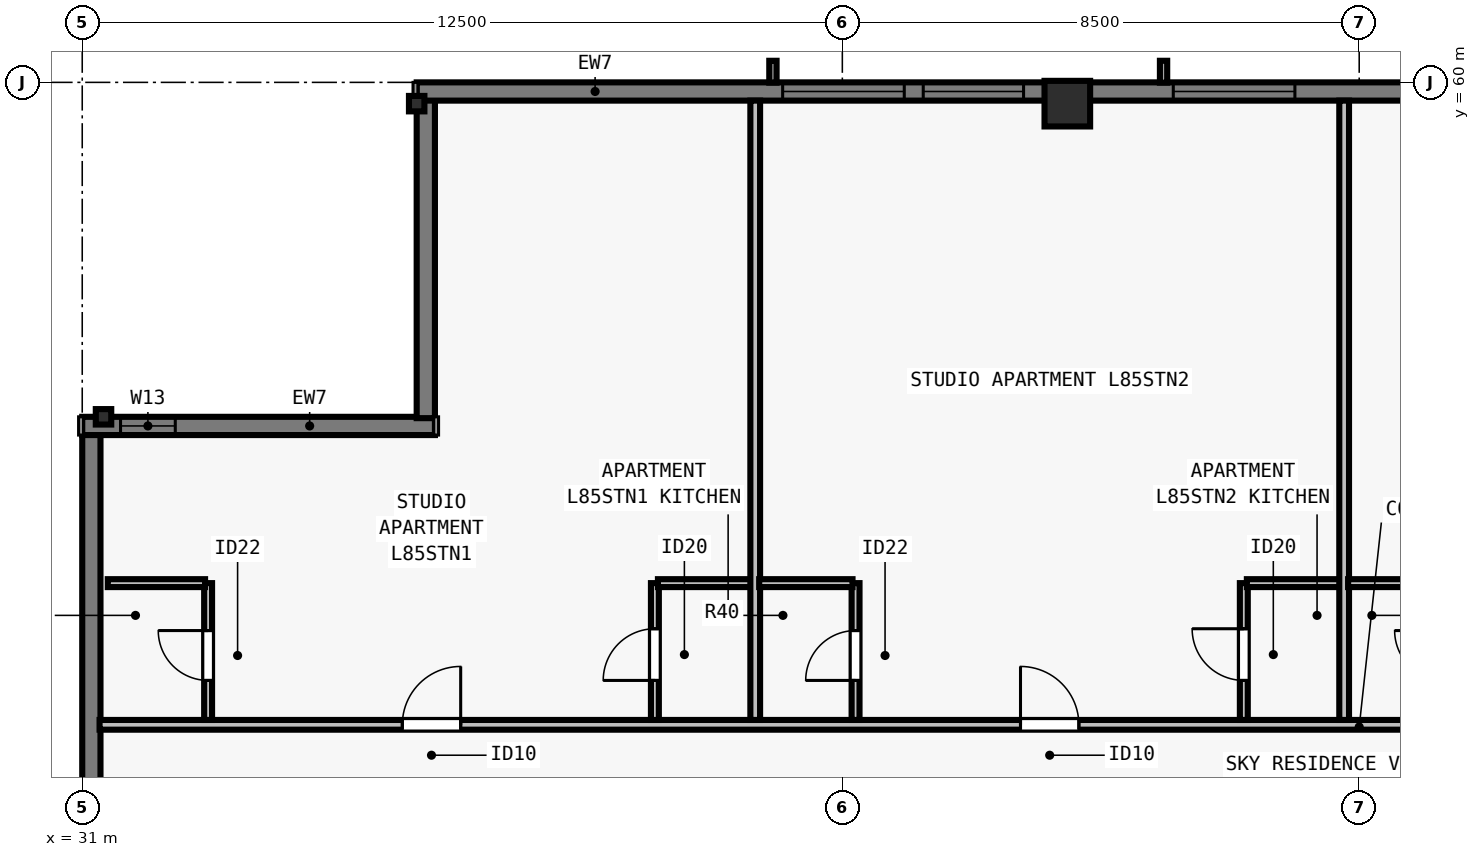
"""IFC4 building model, lengths in metres.
Left out: names, types, materials, properties, quantities, classifications, styles, units other than length and angle.
Written with IfcOpenShell. Run it as: python <this file> out.ifc"""

import sys

from ifc_helpers import new_model, si_unit, direction, frame, frame_2d, origin, origin_2d, place, context, subcontext, project, spatial, rectangle, i_section, extrude, element, fill, save


model = new_model("IFC4")
c1 = context("Model", 3, precision=1e-05, world=origin(), true_north=direction((0.0, 1.0)))
c2 = subcontext(c1, "Body", "Model", "MODEL_VIEW")
j1 = project(units=[si_unit("LENGTHUNIT", "METRE"), si_unit("PLANEANGLEUNIT", "RADIAN")], contexts=[c1])
p1 = place(None, origin())
s1 = spatial("IfcSite", under=j1, at=p1, CompositionType="ELEMENT")
p2 = place(p1, origin())
s2 = spatial("IfcBuilding", under=s1, at=p2, CompositionType="ELEMENT")
p3 = place(p2, frame((0.0, 0.0, 308.5)))
s3 = spatial("IfcBuildingStorey", under=s2, at=p3, CompositionType="ELEMENT", Elevation=308.5)
p4 = place(p3, frame((47.2, 59.65, 0.0), z_axis=(0.0, 0.0, 1.0), x_axis=(1.0, 0.0, 0.0)))
e1 = element("IfcColumn", 1, at=p4, inside=s3, PredefinedType="COLUMN", context=c2, shape_type="SweptSolid", body=[
    extrude(rectangle(XDim=0.75, YDim=0.75, at=origin_2d()), origin(), (0.0, 0.0, 1.0), 3.5),
])
for number, where, z_axis, x_axis in (
    (2, (36.5, 59.65, 0.0), (0.0, 0.0, 1.0), (1.0, 0.0, 0.0)),
    (3, (31.35, 54.5, 0.0), (0.0, 0.0, 1.0), (0.0, 1.0, 0.0)),
):
    element("IfcColumn", number, at=place(p3, frame(where, z_axis=z_axis, x_axis=x_axis)), inside=s3, PredefinedType="COLUMN", context=c2, shape_type="SweptSolid", body=[
        extrude(i_section(OverallWidth=0.254, OverallDepth=0.254, WebThickness=0.009, FlangeThickness=0.014, FilletRadius=0.013, at=origin_2d()), origin(), (0.0, 0.0, 1.0), 3.5),
    ])
p5 = place(p3, frame((31.15, 23.5, 0.0), z_axis=(0.0, 0.0, 1.0), x_axis=(0.0, 1.0, 0.0)))
e4 = element("IfcWall", 4, at=p5, inside=s3, PredefinedType="SOLIDWALL", context=c2, shape_type="SweptSolid", body=[
    extrude(rectangle(XDim=30.722, YDim=0.3, at=frame_2d((15.361, 0.0))), origin(), (0.0, 0.0, 1.0), 3.29),
])
p6 = place(p5, frame((8.331, 0.0, 0.8)))
e5 = element("IfcOpeningElement", 5, at=p6, cuts=e4, PredefinedType="OPENING", context=c2, shape_type="SweptSolid", body=[
    extrude(rectangle(XDim=1.65, YDim=1.758, at=frame_2d((0.825, 0.879))), frame((0.0, 0.16, 0.0), z_axis=(0.0, -1.0, 0.0), x_axis=(1.0, 0.0, 0.0)), (0.0, 0.0, 1.0), 0.32),
])
p7 = place(p5, frame((12.442, 0.0, 0.8)))
e6 = element("IfcOpeningElement", 6, at=p7, cuts=e4, PredefinedType="OPENING", context=c2, shape_type="SweptSolid", body=[
    extrude(rectangle(XDim=2.0, YDim=1.758, at=frame_2d((1.0, 0.879))), frame((0.0, 0.16, 0.0), z_axis=(0.0, -1.0, 0.0), x_axis=(1.0, 0.0, 0.0)), (0.0, 0.0, 1.0), 0.32),
])
p8 = place(p5, frame((16.455, 0.0, 0.8)))
e7 = element("IfcOpeningElement", 7, at=p8, cuts=e4, PredefinedType="OPENING", context=c2, shape_type="SweptSolid", body=[
    extrude(rectangle(XDim=1.65, YDim=1.758, at=frame_2d((0.825, 0.879))), frame((0.0, 0.16, 0.0), z_axis=(0.0, -1.0, 0.0), x_axis=(1.0, 0.0, 0.0)), (0.0, 0.0, 1.0), 0.32),
])
p9 = place(p5, frame((20.967, 0.0, 0.8)))
e8 = element("IfcOpeningElement", 8, at=p9, cuts=e4, PredefinedType="OPENING", context=c2, shape_type="SweptSolid", body=[
    extrude(rectangle(XDim=2.0, YDim=1.758, at=frame_2d((1.0, 0.879))), frame((0.0, 0.16, 0.0), z_axis=(0.0, -1.0, 0.0), x_axis=(1.0, 0.0, 0.0)), (0.0, 0.0, 1.0), 0.32),
])
p10 = place(p3, frame((31.0, 54.35, 0.0), z_axis=(0.0, 0.0, 1.0), x_axis=(1.0, 0.0, 0.0)))
e9 = element("IfcWall", 9, at=p10, inside=s3, PredefinedType="SOLIDWALL", context=c2, shape_type="SweptSolid", body=[
    extrude(rectangle(XDim=5.8, YDim=0.3, at=frame_2d((2.9, 0.0))), origin(), (0.0, 0.0, 1.0), 3.29),
])
p11 = place(p10, frame((0.63, 0.0, 0.8)))
e10 = element("IfcOpeningElement", 10, at=p11, cuts=e9, PredefinedType="OPENING", context=c2, shape_type="SweptSolid", body=[
    extrude(rectangle(XDim=0.9, YDim=1.75, at=frame_2d((0.45, 0.875))), frame((0.0, 0.16, 0.0), z_axis=(0.0, -1.0, 0.0), x_axis=(1.0, 0.0, 0.0)), (0.0, 0.0, 1.0), 0.32),
])
p12 = place(p3, frame((36.65, 54.478, 0.0), z_axis=(0.0, 0.0, 1.0), x_axis=(0.0, 1.0, 0.0)))
e11 = element("IfcWall", 11, at=p12, inside=s3, PredefinedType="SOLIDWALL", context=c2, shape_type="SweptSolid", body=[
    extrude(rectangle(XDim=5.244, YDim=0.3, at=frame_2d((2.622, 0.0))), origin(), (0.0, 0.0, 1.0), 3.29),
])
p13 = place(p3, frame((36.5, 59.85, 0.0), z_axis=(0.0, 0.0, 1.0), x_axis=(1.0, 0.0, 0.0)))
e12 = element("IfcWall", 12, at=p13, inside=s3, PredefinedType="SOLIDWALL", context=c2, shape_type="SweptSolid", body=[
    extrude(rectangle(XDim=30.722, YDim=0.3, at=frame_2d((15.361, 0.0))), origin(), (0.0, 0.0, 1.0), 3.29),
])
p14 = place(p13, frame((6.019, 0.0, 0.8)))
e13 = element("IfcOpeningElement", 13, at=p14, cuts=e12, PredefinedType="OPENING", context=c2, shape_type="SweptSolid", body=[
    extrude(rectangle(XDim=2.0, YDim=1.758, at=frame_2d((1.0, 0.879))), frame((0.0, 0.16, 0.0), z_axis=(0.0, -1.0, 0.0), x_axis=(1.0, 0.0, 0.0)), (0.0, 0.0, 1.0), 0.32),
])
p15 = place(p13, frame((8.331, 0.0, 0.8)))
e14 = element("IfcOpeningElement", 14, at=p15, cuts=e12, PredefinedType="OPENING", context=c2, shape_type="SweptSolid", body=[
    extrude(rectangle(XDim=1.65, YDim=1.758, at=frame_2d((0.825, 0.879))), frame((0.0, 0.16, 0.0), z_axis=(0.0, -1.0, 0.0), x_axis=(1.0, 0.0, 0.0)), (0.0, 0.0, 1.0), 0.32),
])
p16 = place(p13, frame((12.442, 0.0, 0.8)))
e15 = element("IfcOpeningElement", 15, at=p16, cuts=e12, PredefinedType="OPENING", context=c2, shape_type="SweptSolid", body=[
    extrude(rectangle(XDim=2.0, YDim=1.758, at=frame_2d((1.0, 0.879))), frame((0.0, 0.16, 0.0), z_axis=(0.0, -1.0, 0.0), x_axis=(1.0, 0.0, 0.0)), (0.0, 0.0, 1.0), 0.32),
])
p17 = place(p13, frame((16.455, 0.0, 0.8)))
e16 = element("IfcOpeningElement", 16, at=p17, cuts=e12, PredefinedType="OPENING", context=c2, shape_type="SweptSolid", body=[
    extrude(rectangle(XDim=1.65, YDim=1.758, at=frame_2d((0.825, 0.879))), frame((0.0, 0.16, 0.0), z_axis=(0.0, -1.0, 0.0), x_axis=(1.0, 0.0, 0.0)), (0.0, 0.0, 1.0), 0.32),
])
p18 = place(p13, frame((20.967, 0.0, 0.8)))
e17 = element("IfcOpeningElement", 17, at=p18, cuts=e12, PredefinedType="OPENING", context=c2, shape_type="SweptSolid", body=[
    extrude(rectangle(XDim=2.0, YDim=1.758, at=frame_2d((1.0, 0.879))), frame((0.0, 0.16, 0.0), z_axis=(0.0, -1.0, 0.0), x_axis=(1.0, 0.0, 0.0)), (0.0, 0.0, 1.0), 0.32),
])
p19 = place(p13, frame((24.128, 0.0, 0.8)))
e18 = element("IfcOpeningElement", 18, at=p19, cuts=e12, PredefinedType="OPENING", context=c2, shape_type="SweptSolid", body=[
    extrude(rectangle(XDim=1.65, YDim=1.758, at=frame_2d((0.825, 0.879))), frame((0.0, 0.16, 0.0), z_axis=(0.0, -1.0, 0.0), x_axis=(1.0, 0.0, 0.0)), (0.0, 0.0, 1.0), 0.32),
])
p20 = place(p13, frame((26.55, 0.0, 0.8)))
e19 = element("IfcOpeningElement", 19, at=p20, cuts=e12, PredefinedType="OPENING", context=c2, shape_type="SweptSolid", body=[
    extrude(rectangle(XDim=0.9, YDim=1.75, at=frame_2d((0.45, 0.875))), frame((0.0, 0.16, 0.0), z_axis=(0.0, -1.0, 0.0), x_axis=(1.0, 0.0, 0.0)), (0.0, 0.0, 1.0), 0.32),
])
p21 = place(p3, frame((31.285, 49.435, 0.0), z_axis=(0.0, 0.0, 1.0), x_axis=(1.0, 0.0, 0.0)))
e20 = element("IfcWall", 20, at=p21, inside=s3, PredefinedType="PARTITIONING", context=c2, shape_type="SweptSolid", body=[
    extrude(rectangle(XDim=41.43, YDim=0.16, at=frame_2d((20.715, 0.0))), origin(), (0.0, 0.0, 1.0), 3.009),
])
p22 = place(p21, frame((4.979, 0.0, 0.0)))
e21 = element("IfcOpeningElement", 21, at=p22, cuts=e20, PredefinedType="OPENING", context=c2, shape_type="SweptSolid", body=[
    extrude(rectangle(XDim=0.96, YDim=2.18, at=frame_2d((0.48, 1.09))), frame((0.0, 0.09, 0.0), z_axis=(0.0, -1.0, 0.0), x_axis=(1.0, 0.0, 0.0)), (0.0, 0.0, 1.0), 0.18),
])
p23 = place(p21, frame((15.145, 0.0, 0.0)))
e22 = element("IfcOpeningElement", 22, at=p23, cuts=e20, PredefinedType="OPENING", context=c2, shape_type="SweptSolid", body=[
    extrude(rectangle(XDim=0.96, YDim=2.18, at=frame_2d((0.48, 1.09))), frame((0.0, 0.09, 0.0), z_axis=(0.0, -1.0, 0.0), x_axis=(1.0, 0.0, 0.0)), (0.0, 0.0, 1.0), 0.18),
])
p24 = place(p21, frame((25.435, 0.0, 0.0)))
e23 = element("IfcOpeningElement", 23, at=p24, cuts=e20, PredefinedType="OPENING", context=c2, shape_type="SweptSolid", body=[
    extrude(rectangle(XDim=0.96, YDim=2.18, at=frame_2d((0.48, 1.09))), frame((0.0, 0.09, 0.0), z_axis=(0.0, -1.0, 0.0), x_axis=(1.0, 0.0, 0.0)), (0.0, 0.0, 1.0), 0.18),
])
p25 = place(p21, frame((35.849, 0.0, 0.0)))
e24 = element("IfcOpeningElement", 24, at=p25, cuts=e20, PredefinedType="OPENING", context=c2, shape_type="SweptSolid", body=[
    extrude(rectangle(XDim=0.96, YDim=2.18, at=frame_2d((0.48, 1.09))), frame((0.0, 0.09, 0.0), z_axis=(0.0, -1.0, 0.0), x_axis=(1.0, 0.0, 0.0)), (0.0, 0.0, 1.0), 0.18),
])
p26 = place(p3, frame((33.07, 49.515, 0.0), z_axis=(0.0, 0.0, 1.0), x_axis=(0.0, 1.0, 0.0)))
e25 = element("IfcWall", 25, at=p26, inside=s3, PredefinedType="PLUMBINGWALL", context=c2, shape_type="SweptSolid", body=[
    extrude(rectangle(XDim=2.25, YDim=0.13, at=frame_2d((1.125, 0.0))), origin(), (0.0, 0.0, 1.0), 3.29),
])
p27 = place(p26, frame((0.65, 0.0, 0.0)))
e26 = element("IfcOpeningElement", 26, at=p27, cuts=e25, PredefinedType="OPENING", context=c2, shape_type="SweptSolid", body=[
    extrude(rectangle(XDim=0.82, YDim=2.1, at=frame_2d((0.41, 1.05))), frame((0.0, 0.075, 0.0), z_axis=(0.0, -1.0, 0.0), x_axis=(1.0, 0.0, 0.0)), (0.0, 0.0, 1.0), 0.15),
])
p28 = place(p3, frame((31.42, 51.765, 0.0), z_axis=(0.0, 0.0, 1.0), x_axis=(1.0, 0.0, 0.0)))
e27 = element("IfcWall", 27, at=p28, inside=s3, PredefinedType="PLUMBINGWALL", context=c2, shape_type="SweptSolid", body=[
    extrude(rectangle(XDim=1.6, YDim=0.13, at=frame_2d((0.8, 0.0))), origin(), (0.0, 0.0, 1.0), 3.29),
])
p29 = place(p3, frame((40.417, 49.515, 0.0), z_axis=(0.0, 0.0, 1.0), x_axis=(0.0, 1.0, 0.0)))
e28 = element("IfcWall", 28, at=p29, inside=s3, PredefinedType="PLUMBINGWALL", context=c2, shape_type="SweptSolid", body=[
    extrude(rectangle(XDim=2.25, YDim=0.13, at=frame_2d((1.125, 0.0))), origin(), (0.0, 0.0, 1.0), 3.29),
])
p30 = place(p29, frame((0.65, 0.0, 0.0)))
e29 = element("IfcOpeningElement", 29, at=p30, cuts=e28, PredefinedType="OPENING", context=c2, shape_type="SweptSolid", body=[
    extrude(rectangle(XDim=0.85, YDim=2.1, at=frame_2d((0.425, 1.05))), frame((0.0, 0.075, 0.0), z_axis=(0.0, -1.0, 0.0), x_axis=(1.0, 0.0, 0.0)), (0.0, 0.0, 1.0), 0.15),
])
p31 = place(p3, frame((40.468, 51.765, 0.0), z_axis=(0.0, 0.0, 1.0), x_axis=(1.0, 0.0, 0.0)))
e30 = element("IfcWall", 30, at=p31, inside=s3, PredefinedType="PLUMBINGWALL", context=c2, shape_type="SweptSolid", body=[
    extrude(rectangle(XDim=1.6, YDim=0.13, at=frame_2d((0.8, 0.0))), origin(), (0.0, 0.0, 1.0), 3.29),
])
p32 = place(p3, frame((42.067, 49.515, 0.0), z_axis=(0.0, 0.0, 1.0), x_axis=(0.0, 1.0, 0.0)))
e31 = element("IfcWall", 31, at=p32, inside=s3, PredefinedType="PARTITIONING", context=c2, shape_type="SweptSolid", body=[
    extrude(rectangle(XDim=10.185, YDim=0.16, at=frame_2d((5.093, 0.0))), origin(), (0.0, 0.0, 1.0), 2.653),
])
p33 = place(p3, frame((43.718, 49.515, 0.0), z_axis=(0.0, 0.0, 1.0), x_axis=(0.0, 1.0, 0.0)))
e32 = element("IfcWall", 32, at=p33, inside=s3, PredefinedType="PLUMBINGWALL", context=c2, shape_type="SweptSolid", body=[
    extrude(rectangle(XDim=2.25, YDim=0.13, at=frame_2d((1.125, 0.0))), origin(), (0.0, 0.0, 1.0), 3.29),
])
p34 = place(p33, frame((0.65, 0.0, 0.0)))
e33 = element("IfcOpeningElement", 33, at=p34, cuts=e32, PredefinedType="OPENING", context=c2, shape_type="SweptSolid", body=[
    extrude(rectangle(XDim=0.82, YDim=2.1, at=frame_2d((0.41, 1.05))), frame((0.0, 0.075, 0.0), z_axis=(0.0, -1.0, 0.0), x_axis=(1.0, 0.0, 0.0)), (0.0, 0.0, 1.0), 0.15),
])
p35 = place(p3, frame((42.133, 51.765, 0.0), z_axis=(0.0, 0.0, 1.0), x_axis=(1.0, 0.0, 0.0)))
e34 = element("IfcWall", 34, at=p35, inside=s3, PredefinedType="PLUMBINGWALL", context=c2, shape_type="SweptSolid", body=[
    extrude(rectangle(XDim=1.535, YDim=0.13, at=frame_2d((0.768, 0.0))), origin(), (0.0, 0.0, 1.0), 3.29),
])
p36 = place(p3, frame((50.103, 49.515, 0.0), z_axis=(0.0, 0.0, 1.0), x_axis=(0.0, 1.0, 0.0)))
e35 = element("IfcWall", 35, at=p36, inside=s3, PredefinedType="PLUMBINGWALL", context=c2, shape_type="SweptSolid", body=[
    extrude(rectangle(XDim=2.25, YDim=0.13, at=frame_2d((1.125, 0.0))), origin(), (0.0, 0.0, 1.0), 3.009),
])
p37 = place(p36, frame((0.65, 0.0, 0.0)))
e36 = element("IfcOpeningElement", 36, at=p37, cuts=e35, PredefinedType="OPENING", context=c2, shape_type="SweptSolid", body=[
    extrude(rectangle(XDim=0.85, YDim=2.1, at=frame_2d((0.425, 1.05))), frame((0.0, 0.075, 0.0), z_axis=(0.0, -1.0, 0.0), x_axis=(1.0, 0.0, 0.0)), (0.0, 0.0, 1.0), 0.15),
])
p38 = place(p3, frame((50.153, 51.765, 0.0), z_axis=(0.0, 0.0, 1.0), x_axis=(1.0, 0.0, 0.0)))
e37 = element("IfcWall", 37, at=p38, inside=s3, PredefinedType="PLUMBINGWALL", context=c2, shape_type="SweptSolid", body=[
    extrude(rectangle(XDim=1.6, YDim=0.13, at=frame_2d((0.8, 0.0))), origin(), (0.0, 0.0, 1.0), 3.29),
])
p39 = place(p3, frame((51.752, 49.515, 0.0), z_axis=(0.0, 0.0, 1.0), x_axis=(0.0, 1.0, 0.0)))
e38 = element("IfcWall", 38, at=p39, inside=s3, PredefinedType="PARTITIONING", context=c2, shape_type="SweptSolid", body=[
    extrude(rectangle(XDim=10.185, YDim=0.16, at=frame_2d((5.093, 0.0))), origin(), (0.0, 0.0, 1.0), 3.009),
])
p40 = place(p3, frame((51.817, 51.765, 0.0), z_axis=(0.0, 0.0, 1.0), x_axis=(1.0, 0.0, 0.0)))
e39 = element("IfcWall", 39, at=p40, inside=s3, PredefinedType="PLUMBINGWALL", context=c2, shape_type="SweptSolid", body=[
    extrude(rectangle(XDim=1.535, YDim=0.13, at=frame_2d((0.768, 0.0))), origin(), (0.0, 0.0, 1.0), 3.29),
])
p41 = place(p14, origin())
e40 = element("IfcWindow", 40, at=p41, inside=s3, PartitioningType="SINGLE_PANEL", PredefinedType="WINDOW", context=c2, shape_type="SweptSolid", body=[
    extrude(rectangle(XDim=2.0, YDim=1.758, at=frame_2d((1.0, 0.879))), frame((0.0, -0.05, 0.0), z_axis=(0.0, -1.0, 0.0), x_axis=(1.0, 0.0, 0.0)), (0.0, 0.0, 1.0), 0.06),
])
fill(e13, e40)
p42 = place(p15, origin())
e41 = element("IfcWindow", 41, at=p42, inside=s3, PartitioningType="SINGLE_PANEL", PredefinedType="WINDOW", context=c2, shape_type="SweptSolid", body=[
    extrude(rectangle(XDim=1.65, YDim=1.758, at=frame_2d((0.825, 0.879))), frame((0.0, -0.05, 0.0), z_axis=(0.0, -1.0, 0.0), x_axis=(1.0, 0.0, 0.0)), (0.0, 0.0, 1.0), 0.06),
])
fill(e14, e41)
p43 = place(p16, origin())
e42 = element("IfcWindow", 42, at=p43, inside=s3, PartitioningType="SINGLE_PANEL", PredefinedType="WINDOW", context=c2, shape_type="SweptSolid", body=[
    extrude(rectangle(XDim=2.0, YDim=1.758, at=frame_2d((1.0, 0.879))), frame((0.0, -0.05, 0.0), z_axis=(0.0, -1.0, 0.0), x_axis=(1.0, 0.0, 0.0)), (0.0, 0.0, 1.0), 0.06),
])
fill(e15, e42)
p44 = place(p11, origin())
e43 = element("IfcWindow", 43, at=p44, inside=s3, PartitioningType="SINGLE_PANEL", PredefinedType="WINDOW", context=c2, shape_type="SweptSolid", body=[
    extrude(rectangle(XDim=0.9, YDim=1.75, at=frame_2d((0.45, 0.875))), frame((0.0, -0.04, 0.0), z_axis=(0.0, -1.0, 0.0), x_axis=(1.0, 0.0, 0.0)), (0.0, 0.0, 1.0), 0.06),
])
fill(e10, e43)
p45 = place(p27, origin())
e44 = element("IfcDoor", 44, at=p45, inside=s3, OperationType="SINGLE_SWING_RIGHT", PredefinedType="DOOR", context=c2, shape_type="SweptSolid", body=[
    extrude(rectangle(XDim=0.82, YDim=2.1, at=frame_2d((0.41, 1.05))), frame((0.0, 0.025, 0.0), z_axis=(0.0, -1.0, 0.0), x_axis=(1.0, 0.0, 0.0)), (0.0, 0.0, 1.0), 0.05),
])
fill(e26, e44)
p46 = place(p30, origin())
e45 = element("IfcDoor", 45, at=p46, inside=s3, OperationType="SINGLE_SWING_LEFT", PredefinedType="DOOR", context=c2, shape_type="SweptSolid", body=[
    extrude(rectangle(XDim=0.85, YDim=2.1, at=frame_2d((0.425, 1.05))), frame((0.0, 0.025, 0.0), z_axis=(0.0, -1.0, 0.0), x_axis=(1.0, 0.0, 0.0)), (0.0, 0.0, 1.0), 0.05),
])
fill(e29, e45)
p47 = place(p22, origin())
e46 = element("IfcDoor", 46, at=p47, inside=s3, OperationType="SINGLE_SWING_RIGHT", PredefinedType="DOOR", context=c2, shape_type="SweptSolid", body=[
    extrude(rectangle(XDim=0.96, YDim=2.18, at=frame_2d((0.48, 1.09))), frame((0.0, 0.025, 0.0), z_axis=(0.0, -1.0, 0.0), x_axis=(1.0, 0.0, 0.0)), (0.0, 0.0, 1.0), 0.05),
])
fill(e21, e46)
p48 = place(p34, origin())
e47 = element("IfcDoor", 47, at=p48, inside=s3, OperationType="SINGLE_SWING_LEFT", PredefinedType="DOOR", context=c2, shape_type="SweptSolid", body=[
    extrude(rectangle(XDim=0.82, YDim=2.1, at=frame_2d((0.41, 1.05))), frame((0.0, 0.025, 0.0), z_axis=(0.0, -1.0, 0.0), x_axis=(1.0, 0.0, 0.0)), (0.0, 0.0, 1.0), 0.05),
])
fill(e33, e47)
p49 = place(p37, origin())
e48 = element("IfcDoor", 48, at=p49, inside=s3, OperationType="SINGLE_SWING_RIGHT", PredefinedType="DOOR", context=c2, shape_type="SweptSolid", body=[
    extrude(rectangle(XDim=0.85, YDim=2.1, at=frame_2d((0.425, 1.05))), frame((0.0, 0.025, 0.0), z_axis=(0.0, -1.0, 0.0), x_axis=(1.0, 0.0, 0.0)), (0.0, 0.0, 1.0), 0.05),
])
fill(e36, e48)
p50 = place(p23, origin())
e49 = element("IfcDoor", 49, at=p50, inside=s3, OperationType="SINGLE_SWING_LEFT", PredefinedType="DOOR", context=c2, shape_type="SweptSolid", body=[
    extrude(rectangle(XDim=0.96, YDim=2.18, at=frame_2d((0.48, 1.09))), frame((0.0, 0.025, 0.0), z_axis=(0.0, -1.0, 0.0), x_axis=(1.0, 0.0, 0.0)), (0.0, 0.0, 1.0), 0.05),
])
fill(e22, e49)
save(model, sys.argv[1])
